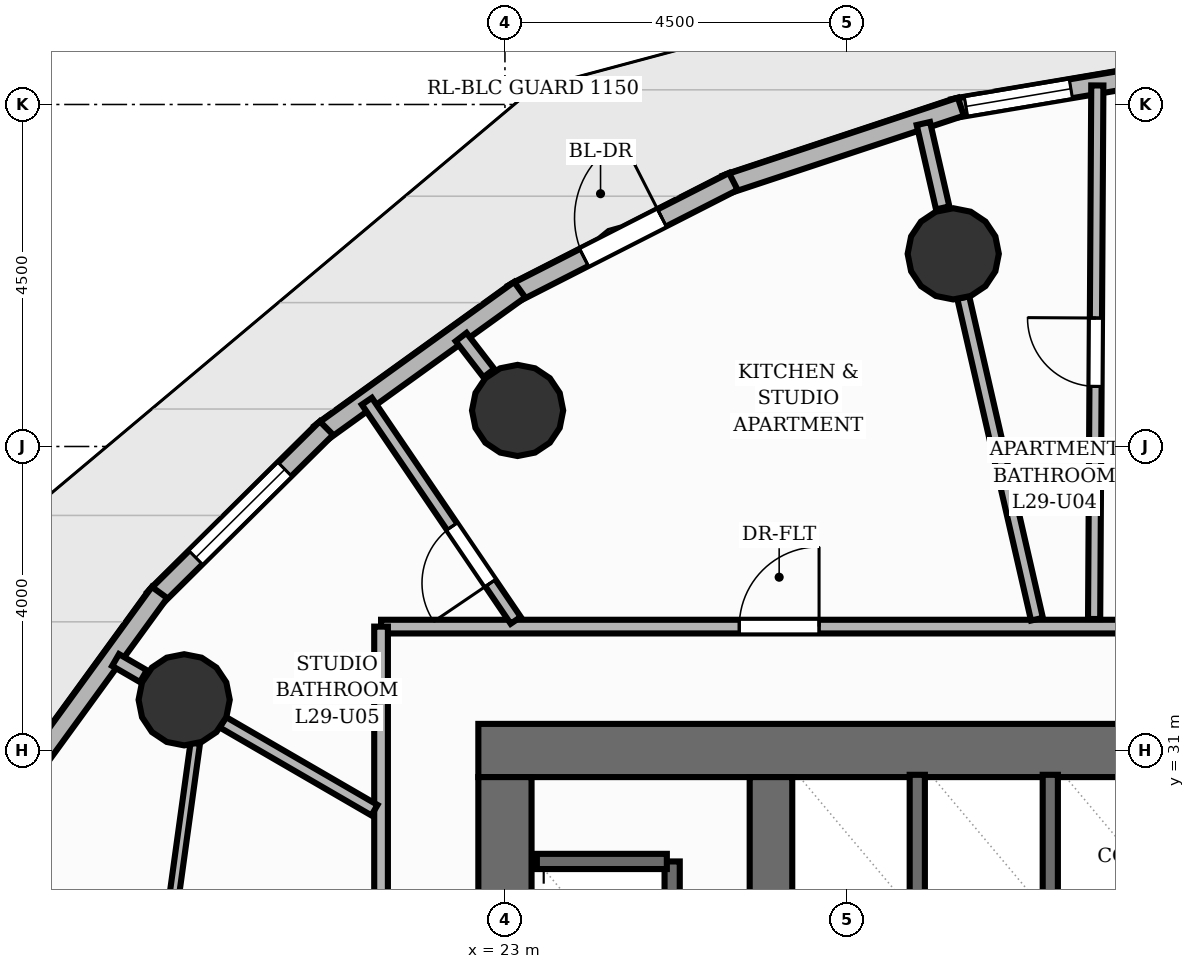
"""IFC4 building model, lengths in metres.
Left out: names, types, materials, properties, quantities, classifications, styles, units other than length and angle.
Written with IfcOpenShell. Run it as: python <this file> out.ifc"""

import sys

from ifc_helpers import new_model, si_unit, direction, frame, frame_2d, origin, origin_2d, place, context, subcontext, project, spatial, rectangle, circle, extrude, element, fill, save


model = new_model("IFC4")
c1 = context("Model", 3, precision=1e-05, world=origin(), true_north=direction((0.0, 1.0)))
c2 = subcontext(c1, "Body", "Model", "MODEL_VIEW")
j1 = project(units=[si_unit("LENGTHUNIT", "METRE"), si_unit("PLANEANGLEUNIT", "RADIAN")], contexts=[c1])
p1 = place(None, origin())
s1 = spatial("IfcSite", under=j1, at=p1, CompositionType="ELEMENT")
p2 = place(p1, origin())
s2 = spatial("IfcBuilding", under=s1, at=p2, CompositionType="ELEMENT")
p3 = place(p2, frame((0.0, 0.0, 99.68)))
s3 = spatial("IfcBuildingStorey", under=s2, at=p3, CompositionType="ELEMENT", Elevation=99.68)
p4 = place(p3, frame((22.65, 31.0, 0.0), z_axis=(0.0, 0.0, 1.0), x_axis=(1.0, 0.0, 0.0)))
e1 = element("IfcWall", 1, at=p4, inside=s3, PredefinedType="SHEAR", context=c2, shape_type="SweptSolid", body=[
    extrude(rectangle(XDim=18.7, YDim=0.7, at=frame_2d((9.35, 0.0))), origin(), (0.0, 0.0, 1.0), 3.2),
])
p5 = place(p4, frame((11.75, 0.0, 0.0)))
e2 = element("IfcOpeningElement", 2, at=p5, cuts=e1, PredefinedType="OPENING", context=c2, shape_type="SweptSolid", body=[
    extrude(rectangle(XDim=1.1, YDim=2.15, at=frame_2d((0.55, 1.075))), frame((0.0, 0.36, 0.0), z_axis=(0.0, -1.0, 0.0), x_axis=(1.0, 0.0, 0.0)), (0.0, 0.0, 1.0), 0.72),
])
p6 = place(p3, frame((23.0, 17.35, 0.0), z_axis=(0.0, 0.0, 1.0), x_axis=(0.0, 1.0, 0.0)))
e3 = element("IfcWall", 3, at=p6, inside=s3, PredefinedType="SHEAR", context=c2, shape_type="SweptSolid", body=[
    extrude(rectangle(XDim=13.3, YDim=0.7, at=frame_2d((6.65, 0.0))), origin(), (0.0, 0.0, 1.0), 3.2),
])
p7 = place(p3, frame((26.5, 17.35, 0.0), z_axis=(0.0, 0.0, 1.0), x_axis=(0.0, 1.0, 0.0)))
e4 = element("IfcWall", 4, at=p7, inside=s3, PredefinedType="SHEAR", context=c2, shape_type="SweptSolid", body=[
    extrude(rectangle(XDim=13.3, YDim=0.56, at=frame_2d((6.65, 0.0))), origin(), (0.0, 0.0, 1.0), 3.2),
])
for number, where, z_axis, x_axis in (
    (5, (28.898, 37.535, 0.0), (0.0, 0.0, 1.0), (1.0, 0.0, 0.0)),
    (6, (23.167, 35.474, 0.0), (0.0, 0.0, 1.0), (1.0, 0.0, 0.0)),
    (7, (18.78, 31.667, 0.0), (0.0, 0.0, 1.0), (1.0, 0.0, 0.0)),
):
    element("IfcColumn", number, at=place(p3, frame(where, z_axis=z_axis, x_axis=x_axis)), inside=s3, PredefinedType="COLUMN", context=c2, shape_type="SweptSolid", body=[
        extrude(circle(Radius=0.6, at=origin_2d()), origin(), (0.0, 0.0, 1.0), 3.2),
    ])
p8 = place(p3, frame((28.893, 39.445, 0.0), z_axis=(0.0, 0.0, 1.0), x_axis=(0.986043062305, 0.166490478044, 0.0)))
e8 = element("IfcWall", 8, at=p8, inside=s3, PredefinedType="SOLIDWALL", context=c2, shape_type="SweptSolid", body=[
    extrude(rectangle(XDim=3.236, YDim=0.25, at=frame_2d((1.618, 0.0))), origin(), (0.0, 0.0, 1.0), 2.96),
])
p9 = place(p8, frame((0.175, 0.0, 0.85)))
e9 = element("IfcOpeningElement", 9, at=p9, cuts=e8, PredefinedType="OPENING", context=c2, shape_type="SweptSolid", body=[
    extrude(rectangle(XDim=1.4, YDim=1.55, at=frame_2d((0.7, 0.775))), frame((0.0, 0.135, 0.0), z_axis=(0.0, -1.0, 0.0), x_axis=(1.0, 0.0, 0.0)), (0.0, 0.0, 1.0), 0.27),
])
p10 = place(p3, frame((25.904, 38.445, 0.0), z_axis=(0.0, 0.0, 1.0), x_axis=(0.949206293356, 0.314654433709, 0.0)))
e10 = element("IfcWall", 10, at=p10, inside=s3, PredefinedType="SOLIDWALL", context=c2, shape_type="SweptSolid", body=[
    extrude(rectangle(XDim=3.26, YDim=0.25, at=frame_2d((1.63, 0.0))), origin(), (0.0, 0.0, 1.0), 2.96),
])
p11 = place(p3, frame((23.101, 37.006, 0.0), z_axis=(0.0, 0.0, 1.0), x_axis=(0.89081817606, 0.454359964347, 0.0)))
e11 = element("IfcWall", 11, at=p11, inside=s3, PredefinedType="SOLIDWALL", context=c2, shape_type="SweptSolid", body=[
    extrude(rectangle(XDim=3.26, YDim=0.25, at=frame_2d((1.63, 0.0))), origin(), (0.0, 0.0, 1.0), 2.96),
])
p12 = place(p11, frame((1.055, 0.0, 0.0)))
e12 = element("IfcOpeningElement", 12, at=p12, cuts=e11, PredefinedType="OPENING", context=c2, shape_type="SweptSolid", body=[
    extrude(rectangle(XDim=1.15, YDim=2.2, at=frame_2d((0.575, 1.1))), frame((0.0, 0.135, 0.0), z_axis=(0.0, -1.0, 0.0), x_axis=(1.0, 0.0, 0.0)), (0.0, 0.0, 1.0), 0.27),
])
p13 = place(p3, frame((20.568, 35.171, 0.0), z_axis=(0.0, 0.0, 1.0), x_axis=(0.81131534838, 0.584608762749, 0.0)))
e13 = element("IfcWall", 13, at=p13, inside=s3, PredefinedType="SOLIDWALL", context=c2, shape_type="SweptSolid", body=[
    extrude(rectangle(XDim=3.236, YDim=0.25, at=frame_2d((1.618, 0.0))), origin(), (0.0, 0.0, 1.0), 2.96),
])
p14 = place(p3, frame((18.384, 32.996, 0.0), z_axis=(0.0, 0.0, 1.0), x_axis=(0.710540573889, 0.703656232017, 0.0)))
e14 = element("IfcWall", 14, at=p14, inside=s3, PredefinedType="SOLIDWALL", context=c2, shape_type="SweptSolid", body=[
    extrude(rectangle(XDim=3.192, YDim=0.25, at=frame_2d((1.596, 0.0))), origin(), (0.0, 0.0, 1.0), 2.96),
])
p15 = place(p14, frame((0.771, 0.0, 0.85)))
e15 = element("IfcOpeningElement", 15, at=p15, cuts=e14, PredefinedType="OPENING", context=c2, shape_type="SweptSolid", body=[
    extrude(rectangle(XDim=1.65, YDim=1.55, at=frame_2d((0.825, 0.775))), frame((0.0, 0.135, 0.0), z_axis=(0.0, -1.0, 0.0), x_axis=(1.0, 0.0, 0.0)), (0.0, 0.0, 1.0), 0.27),
])
p16 = place(p3, frame((16.614, 30.547, 0.0), z_axis=(0.0, 0.0, 1.0), x_axis=(0.588208785685, 0.808709109905, 0.0)))
e16 = element("IfcWall", 16, at=p16, inside=s3, PredefinedType="SOLIDWALL", context=c2, shape_type="SweptSolid", body=[
    extrude(rectangle(XDim=3.131, YDim=0.25, at=frame_2d((1.565, 0.0))), origin(), (0.0, 0.0, 1.0), 2.96),
])
p17 = place(p3, frame((25.2, 18.46, 0.0), z_axis=(0.0, 0.0, 1.0), x_axis=(0.0, 1.0, 0.0)))
e17 = element("IfcWall", 17, at=p17, inside=s3, PredefinedType="SHEAR", context=c2, shape_type="SweptSolid", body=[
    extrude(rectangle(XDim=11.08, YDim=0.2, at=frame_2d((5.54, 0.0))), origin(), (0.0, 0.0, 1.0), 3.2),
])
p18 = place(p3, frame((23.42, 29.54, 0.0), z_axis=(0.0, 0.0, 1.0), x_axis=(1.0, 0.0, 0.0)))
e18 = element("IfcWall", 18, at=p18, inside=s3, PredefinedType="SHEAR", context=c2, shape_type="SweptSolid", body=[
    extrude(rectangle(XDim=1.71, YDim=0.2, at=frame_2d((0.855, 0.0))), origin(), (0.0, 0.0, 1.0), 3.2),
])
for number, where, z_axis, x_axis in (
    (19, (28.425, 29.02, 0.0), (0.0, 0.0, 1.0), (0.0, 1.0, 0.0)),
    (20, (30.175, 29.02, 0.0), (0.0, 0.0, 1.0), (0.0, 1.0, 0.0)),
):
    element("IfcWall", number, at=place(p3, frame(where, z_axis=z_axis, x_axis=x_axis)), inside=s3, PredefinedType="SHEAR", context=c2, shape_type="SweptSolid", body=[
        extrude(rectangle(XDim=1.66, YDim=0.2, at=frame_2d((0.83, 0.0))), origin(), (0.0, 0.0, 1.0), 3.2),
    ])
p19 = place(p3, frame((28.76, 38.139, 0.0), z_axis=(0.0, 0.0, 1.0), x_axis=(-0.223325248633, 0.974743983476, 0.0)))
e21 = element("IfcWall", 21, at=p19, inside=s3, PredefinedType="PARTITIONING", context=c2, shape_type="SweptSolid", body=[
    extrude(rectangle(XDim=1.139, YDim=0.18, at=frame_2d((0.57, 0.0))), origin(), (0.0, 0.0, 1.0), 2.261),
])
p20 = place(p3, frame((22.788, 35.966, 0.0), z_axis=(0.0, 0.0, 1.0), x_axis=(-0.609809319142, 0.792548165279, 0.0)))
e22 = element("IfcWall", 22, at=p20, inside=s3, PredefinedType="PARTITIONING", context=c2, shape_type="SweptSolid", body=[
    extrude(rectangle(XDim=0.599, YDim=0.18, at=frame_2d((0.299, 0.0))), origin(), (0.0, 0.0, 1.0), 2.261),
])
p21 = place(p3, frame((18.243, 31.978, 0.0), z_axis=(0.0, 0.0, 1.0), x_axis=(-0.864926134071, 0.501899175733, 0.0)))
e23 = element("IfcWall", 23, at=p21, inside=s3, PredefinedType="PARTITIONING", context=c2, shape_type="SweptSolid", body=[
    extrude(rectangle(XDim=0.424, YDim=0.18, at=frame_2d((0.212, 0.0))), origin(), (0.0, 0.0, 1.0), 2.261),
])
p22 = place(p3, frame((21.37, 32.63, 0.0), z_axis=(0.0, 0.0, 1.0), x_axis=(1.0, 0.0, 0.0)))
e24 = element("IfcWall", 24, at=p22, inside=s3, PredefinedType="PARTITIONING", context=c2, shape_type="SweptSolid", body=[
    extrude(rectangle(XDim=12.686, YDim=0.18, at=frame_2d((6.343, 0.0))), origin(), (0.0, 0.0, 1.0), 2.955),
])
p23 = place(p22, frame((10.499, 0.0, 0.0)))
e25 = element("IfcOpeningElement", 25, at=p23, cuts=e24, PredefinedType="OPENING", context=c2, shape_type="SweptSolid", body=[
    extrude(rectangle(XDim=1.05, YDim=2.15, at=frame_2d((0.525, 1.075))), frame((0.0, 0.1, 0.0), z_axis=(0.0, -1.0, 0.0), x_axis=(1.0, 0.0, 0.0)), (0.0, 0.0, 1.0), 0.2),
])
p24 = place(p22, frame((4.713, 0.0, 0.0)))
e26 = element("IfcOpeningElement", 26, at=p24, cuts=e24, PredefinedType="OPENING", context=c2, shape_type="SweptSolid", body=[
    extrude(rectangle(XDim=1.05, YDim=2.15, at=frame_2d((0.525, 1.075))), frame((0.0, 0.1, 0.0), z_axis=(0.0, -1.0, 0.0), x_axis=(1.0, 0.0, 0.0)), (0.0, 0.0, 1.0), 0.2),
])
p25 = place(p3, frame((21.37, 21.771, 0.0), z_axis=(0.0, 0.0, 1.0), x_axis=(0.0, 1.0, 0.0)))
e27 = element("IfcWall", 27, at=p25, inside=s3, PredefinedType="PARTITIONING", context=c2, shape_type="SweptSolid", body=[
    extrude(rectangle(XDim=10.859, YDim=0.18, at=frame_2d((5.43, 0.0))), origin(), (0.0, 0.0, 1.0), 2.955),
])
p26 = place(p3, frame((30.752, 32.73, 0.0), z_axis=(0.0, 0.0, 1.0), x_axis=(0.006016026892, 0.999981903546, 0.0)))
e28 = element("IfcWall", 28, at=p26, inside=s3, PredefinedType="PLUMBINGWALL", context=c2, shape_type="SweptSolid", body=[
    extrude(rectangle(XDim=7.021, YDim=0.16, at=frame_2d((3.51, 0.0))), origin(), (0.0, 0.0, 1.0), 2.955),
])
p27 = place(p26, frame((3.06, 0.0, 0.0)))
e29 = element("IfcOpeningElement", 29, at=p27, cuts=e28, PredefinedType="OPENING", context=c2, shape_type="SweptSolid", body=[
    extrude(rectangle(XDim=0.9, YDim=2.1, at=frame_2d((0.45, 1.05))), frame((0.0, 0.09, 0.0), z_axis=(0.0, -1.0, 0.0), x_axis=(1.0, 0.0, 0.0)), (0.0, 0.0, 1.0), 0.18),
])
p28 = place(p3, frame((30.0, 32.728, 0.0), z_axis=(0.0, 0.0, 1.0), x_axis=(-0.223409547543, 0.974724665773, 0.0)))
e30 = element("IfcWall", 30, at=p28, inside=s3, PredefinedType="PLUMBINGWALL", context=c2, shape_type="SweptSolid", body=[
    extrude(rectangle(XDim=4.342, YDim=0.16, at=frame_2d((2.171, 0.0))), origin(), (0.0, 0.0, 1.0), 2.261),
])
p29 = place(p3, frame((23.142, 32.713, 0.0), z_axis=(0.0, 0.0, 1.0), x_axis=(-0.561921019334, 0.827190889717, 0.0)))
e31 = element("IfcWall", 31, at=p29, inside=s3, PredefinedType="PLUMBINGWALL", context=c2, shape_type="SweptSolid", body=[
    extrude(rectangle(XDim=3.485, YDim=0.16, at=frame_2d((1.743, 0.0))), origin(), (0.0, 0.0, 1.0), 2.641),
])
p30 = place(p29, frame((0.593, 0.0, 0.0)))
e32 = element("IfcOpeningElement", 32, at=p30, cuts=e31, PredefinedType="OPENING", context=c2, shape_type="SweptSolid", body=[
    extrude(rectangle(XDim=0.9, YDim=2.1, at=frame_2d((0.45, 1.05))), frame((0.0, 0.09, 0.0), z_axis=(0.0, -1.0, 0.0), x_axis=(1.0, 0.0, 0.0)), (0.0, 0.0, 1.0), 0.18),
])
p31 = place(p3, frame((21.283, 30.215, 0.0), z_axis=(0.0, 0.0, 1.0), x_axis=(-0.865054150745, 0.501678498921, 0.0)))
e33 = element("IfcWall", 33, at=p31, inside=s3, PredefinedType="PLUMBINGWALL", context=c2, shape_type="SweptSolid", body=[
    extrude(rectangle(XDim=2.307, YDim=0.16, at=frame_2d((1.154, 0.0))), origin(), (0.0, 0.0, 1.0), 2.261),
])
p32 = place(p3, frame((17.542, 21.073, 0.0), z_axis=(0.0, 0.0, 1.0), x_axis=(0.136714950607, 0.99061042912, 0.0)))
e34 = element("IfcWall", 34, at=p32, inside=s3, PredefinedType="PARTITIONING", context=c2, shape_type="SweptSolid", body=[
    extrude(rectangle(XDim=10.12, YDim=0.125, at=frame_2d((5.06, 0.0))), origin(), (0.0, 0.0, 1.0), 2.955),
])
p33 = place(p32, frame((4.47, 0.0, 0.0)))
e35 = element("IfcOpeningElement", 35, at=p33, cuts=e34, PredefinedType="OPENING", context=c2, shape_type="SweptSolid", body=[
    extrude(rectangle(XDim=0.9, YDim=2.1, at=frame_2d((0.45, 1.05))), frame((0.0, 0.073, 0.0), z_axis=(0.0, -1.0, 0.0), x_axis=(1.0, 0.0, 0.0)), (0.0, 0.0, 1.0), 0.145),
])
p34 = place(p12, origin())
e36 = element("IfcDoor", 36, at=p34, inside=s3, OperationType="SINGLE_SWING_RIGHT", PredefinedType="DOOR", context=c2, shape_type="SweptSolid", body=[
    extrude(rectangle(XDim=1.15, YDim=2.2, at=frame_2d((0.575, 1.1))), frame((0.0, 0.025, 0.0), z_axis=(0.0, -1.0, 0.0), x_axis=(1.0, 0.0, 0.0)), (0.0, 0.0, 1.0), 0.05),
])
fill(e12, e36)
p35 = place(p9, origin())
e37 = element("IfcWindow", 37, at=p35, inside=s3, PartitioningType="SINGLE_PANEL", PredefinedType="WINDOW", context=c2, shape_type="SweptSolid", body=[
    extrude(rectangle(XDim=1.4, YDim=1.55, at=frame_2d((0.7, 0.775))), frame((0.0, 0.03, 0.0), z_axis=(0.0, -1.0, 0.0), x_axis=(1.0, 0.0, 0.0)), (0.0, 0.0, 1.0), 0.06),
])
fill(e9, e37)
p36 = place(p15, origin())
e38 = element("IfcWindow", 38, at=p36, inside=s3, PartitioningType="SINGLE_PANEL", PredefinedType="WINDOW", context=c2, shape_type="SweptSolid", body=[
    extrude(rectangle(XDim=1.65, YDim=1.55, at=frame_2d((0.825, 0.775))), frame((0.0, 0.03, 0.0), z_axis=(0.0, -1.0, 0.0), x_axis=(1.0, 0.0, 0.0)), (0.0, 0.0, 1.0), 0.06),
])
fill(e15, e38)
p37 = place(p27, origin())
e39 = element("IfcDoor", 39, at=p37, inside=s3, OperationType="SINGLE_SWING_RIGHT", PredefinedType="DOOR", context=c2, shape_type="SweptSolid", body=[
    extrude(rectangle(XDim=0.9, YDim=2.1, at=frame_2d((0.45, 1.05))), frame((0.0, 0.025, 0.0), z_axis=(0.0, -1.0, 0.0), x_axis=(1.0, 0.0, 0.0)), (0.0, 0.0, 1.0), 0.05),
])
fill(e29, e39)
p38 = place(p24, origin())
e40 = element("IfcDoor", 40, at=p38, inside=s3, OperationType="SINGLE_SWING_RIGHT", PredefinedType="DOOR", context=c2, shape_type="SweptSolid", body=[
    extrude(rectangle(XDim=1.05, YDim=2.15, at=frame_2d((0.525, 1.075))), frame((0.0, 0.025, 0.0), z_axis=(0.0, -1.0, 0.0), x_axis=(1.0, 0.0, 0.0)), (0.0, 0.0, 1.0), 0.05),
])
fill(e26, e40)
p39 = place(p30, origin())
e41 = element("IfcDoor", 41, at=p39, inside=s3, OperationType="SINGLE_SWING_LEFT", PredefinedType="DOOR", context=c2, shape_type="SweptSolid", body=[
    extrude(rectangle(XDim=0.9, YDim=2.1, at=frame_2d((0.45, 1.05))), frame((0.0, 0.025, 0.0), z_axis=(0.0, -1.0, 0.0), x_axis=(1.0, 0.0, 0.0)), (0.0, 0.0, 1.0), 0.05),
])
fill(e32, e41)
save(model, sys.argv[1])
